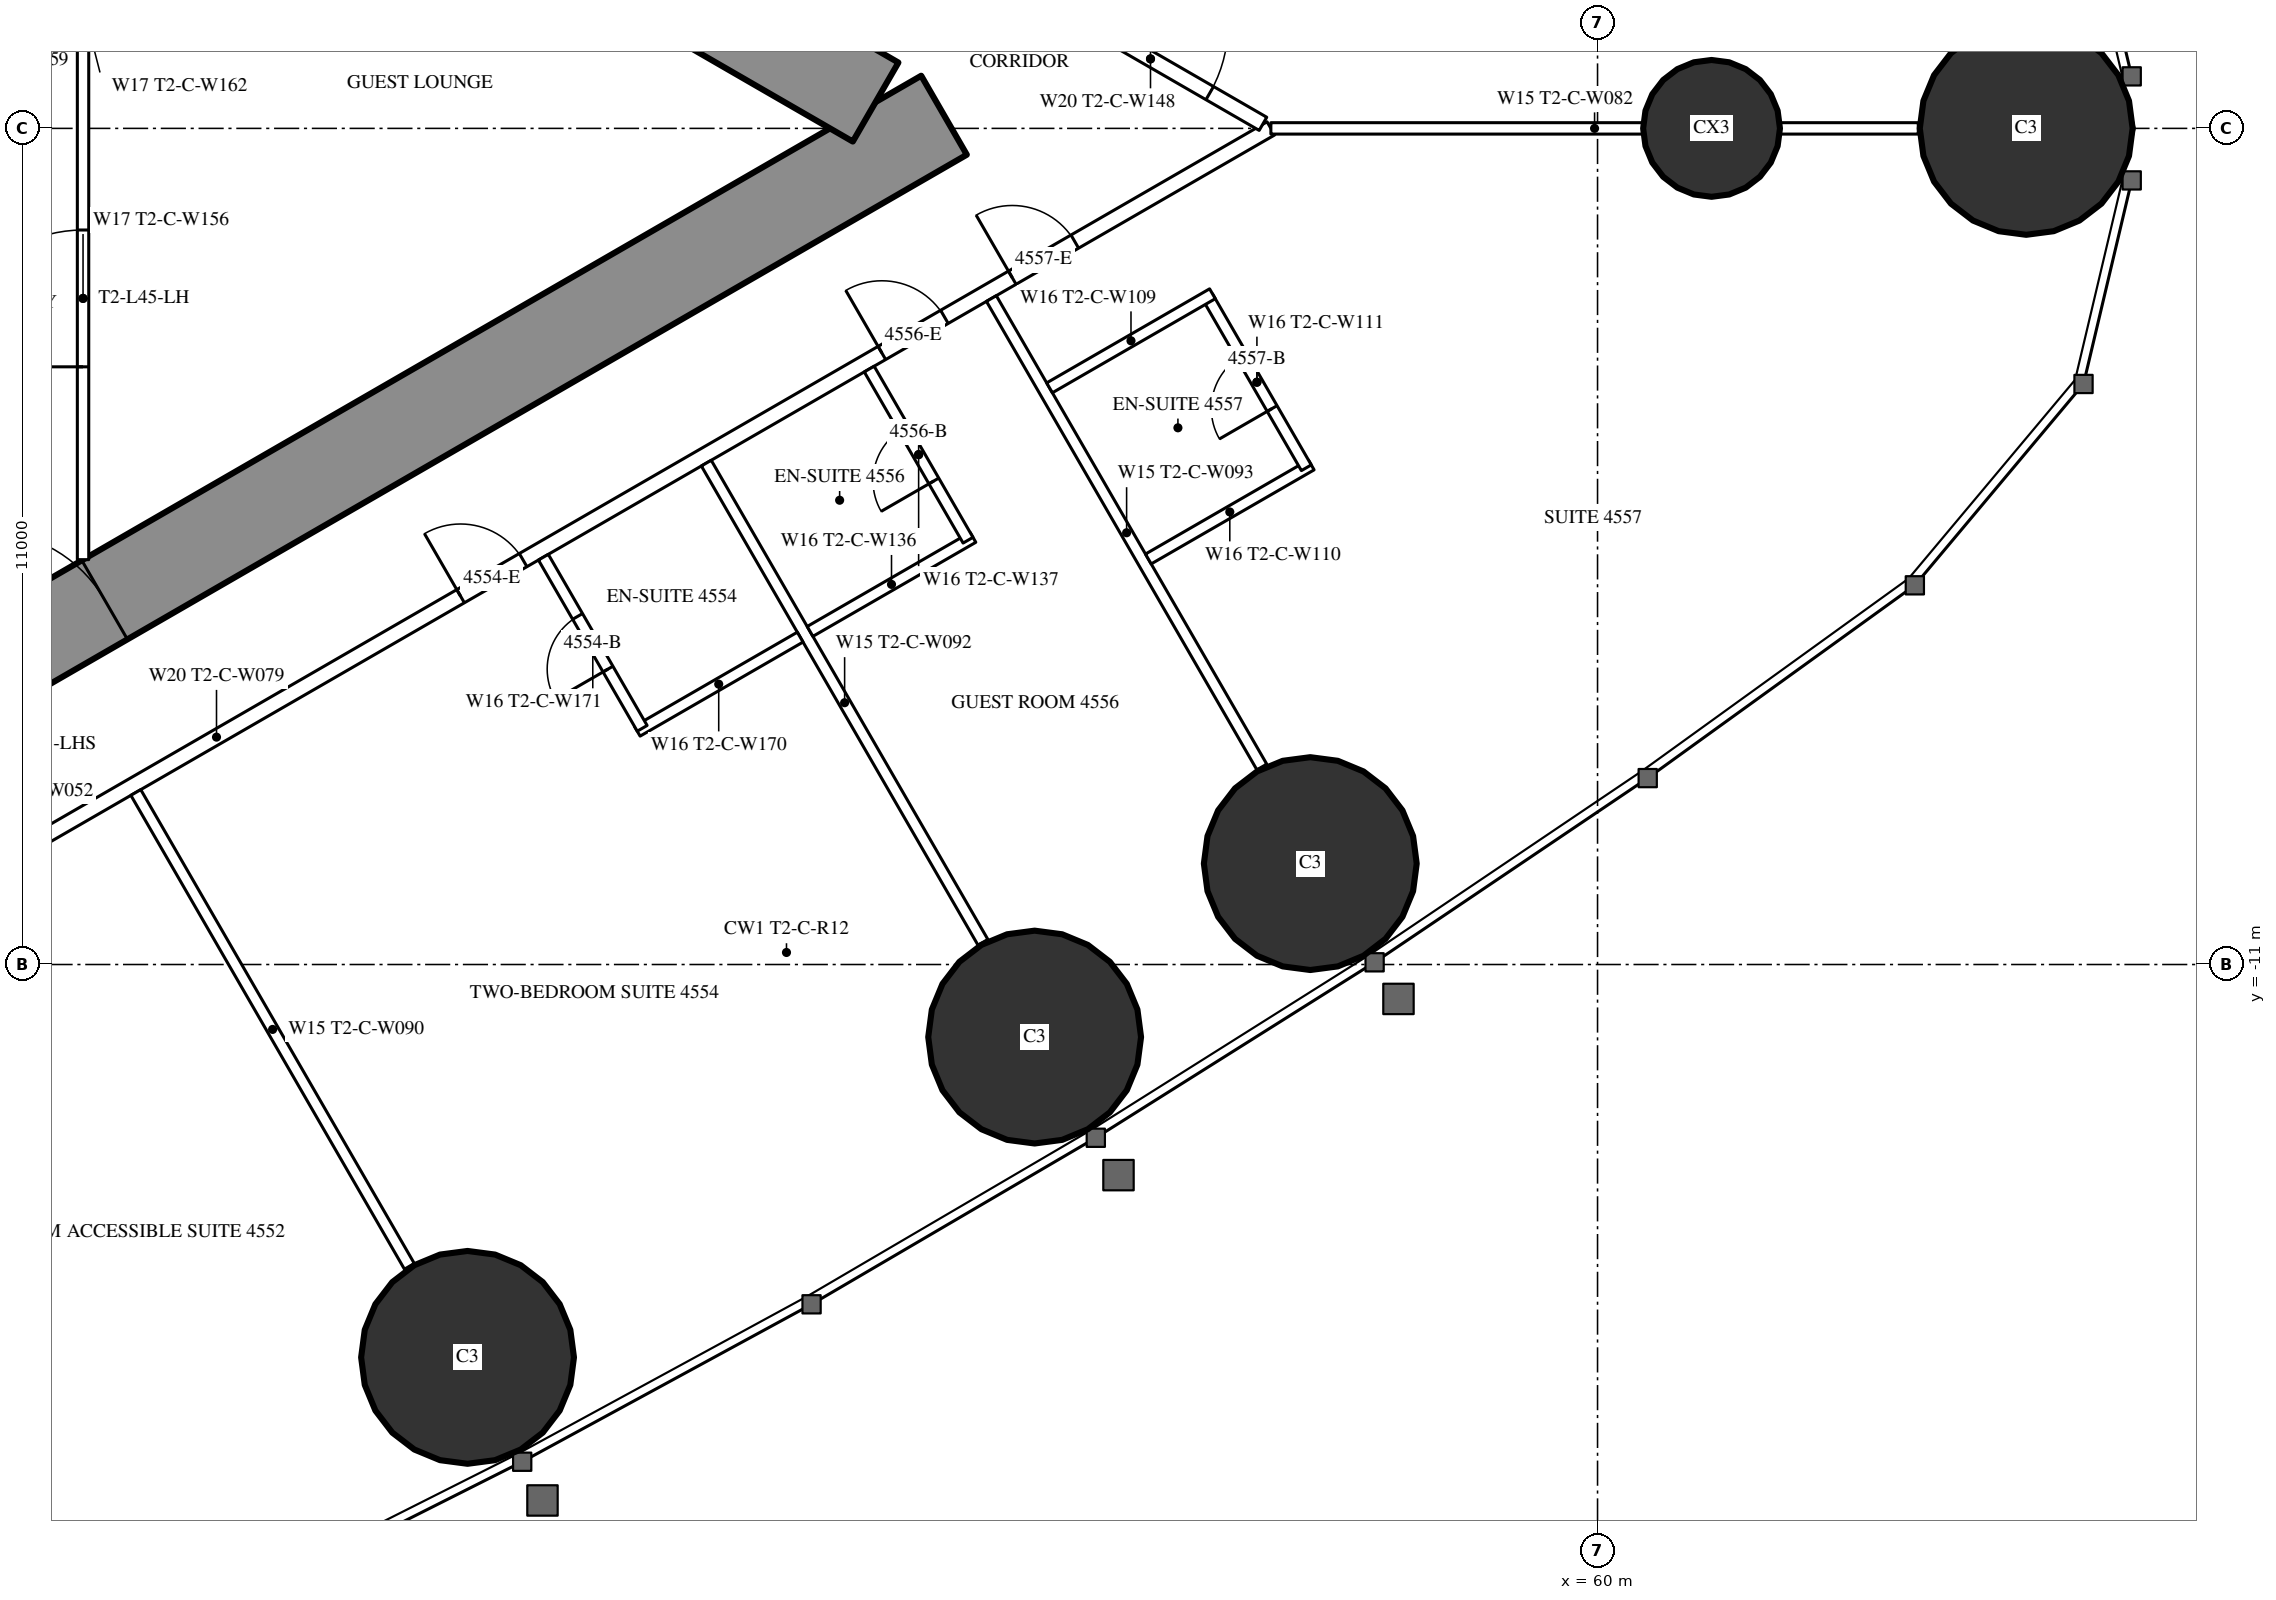
"""IFC4 building model, lengths in metres.
Left out: names, types, materials, properties, quantities, classifications, styles, units other than length and angle.
Written with IfcOpenShell. Run it as: python <this file> out.ifc"""

import sys

from ifc_helpers import new_model, si_unit, direction, frame, frame_2d, origin, origin_2d, place, context, subcontext, project, spatial, rectangle, circle, extrude, element, fill, save


model = new_model("IFC4")
c1 = context("Model", 3, precision=1e-05, world=origin(), true_north=direction((0.0, 1.0)))
c2 = subcontext(c1, "Body", "Model", "MODEL_VIEW")
j1 = project(units=[si_unit("LENGTHUNIT", "METRE"), si_unit("PLANEANGLEUNIT", "RADIAN")], contexts=[c1])
p1 = place(None, origin())
s1 = spatial("IfcSite", under=j1, at=p1, CompositionType="ELEMENT")
p2 = place(p1, origin())
s2 = spatial("IfcBuilding", under=s1, at=p2, CompositionType="ELEMENT")
p3 = place(p2, frame((0.0, 0.0, 170.3)))
s3 = spatial("IfcBuildingStorey", under=s2, at=p3, CompositionType="ELEMENT", Elevation=170.3)
for number, where, z_axis, x_axis in (
    (1, (65.64, 0.0, 0.0), (0.0, 0.0, 1.0), (1.0, 0.0, 0.0)),
    (2, (45.134, -16.168, 0.0), (0.0, 0.0, 1.0), (1.0, 0.0, 0.0)),
    (3, (52.594, -11.955, 0.0), (0.0, 0.0, 1.0), (1.0, 0.0, 0.0)),
    (4, (56.221, -9.672, 0.0), (0.0, 0.0, 1.0), (1.0, 0.0, 0.0)),
):
    element("IfcColumn", number, at=place(p3, frame(where, z_axis=z_axis, x_axis=x_axis)), inside=s3, PredefinedType="COLUMN", context=c2, shape_type="SweptSolid", body=[
        extrude(circle(Radius=1.4, at=origin_2d()), origin(), (0.0, 0.0, 1.0), 3.5),
    ])
p4 = place(p3, frame((61.5, 0.0, 0.0), z_axis=(0.0, 0.0, 1.0), x_axis=(1.0, 0.0, 0.0)))
e5 = element("IfcColumn", 5, at=p4, inside=s3, PredefinedType="COLUMN", context=c2, shape_type="SweptSolid", body=[
    extrude(circle(Radius=0.9, at=origin_2d()), origin(), (0.0, 0.0, 1.0), 3.5),
])
p5 = place(p3, frame((27.2, -13.8, 0.0), z_axis=(0.0, 0.0, 1.0), x_axis=(0.866027159892, 0.499996958321, 0.0)))
e6 = element("IfcWall", 6, at=p5, inside=s3, PredefinedType="SHEAR", context=c2, shape_type="SweptSolid", body=[
    extrude(rectangle(XDim=27.947, YDim=1.2, at=frame_2d((13.973, 0.0))), origin(), (0.0, 0.0, 1.0), 3.5),
])
p6 = place(p5, frame((4.6, 0.0, 0.0)))
e7 = element("IfcOpeningElement", 7, at=p6, cuts=e6, PredefinedType="OPENING", context=c2, shape_type="SweptSolid", body=[
    extrude(rectangle(XDim=1.0, YDim=2.2, at=frame_2d((0.5, 1.1))), frame((0.0, 0.61, 0.0), z_axis=(0.0, -1.0, 0.0), x_axis=(1.0, 0.0, 0.0)), (0.0, 0.0, 1.0), 1.22),
])
p7 = place(p5, frame((13.395, 0.0, 0.0)))
e8 = element("IfcOpeningElement", 8, at=p7, cuts=e6, PredefinedType="OPENING", context=c2, shape_type="SweptSolid", body=[
    extrude(rectangle(XDim=1.8, YDim=2.2, at=frame_2d((0.9, 1.1))), frame((0.0, 0.61, 0.0), z_axis=(0.0, -1.0, 0.0), x_axis=(1.0, 0.0, 0.0)), (0.0, 0.0, 1.0), 1.22),
])
p8 = place(p3, frame((27.2, 13.8, 0.0), z_axis=(0.0, 0.0, 1.0), x_axis=(0.866024515034, -0.500001539357, 0.0)))
e9 = element("IfcWall", 9, at=p8, inside=s3, PredefinedType="SHEAR", context=c2, shape_type="SweptSolid", body=[
    extrude(rectangle(XDim=26.907, YDim=1.2, at=frame_2d((13.454, 0.0))), origin(), (0.0, 0.0, 1.0), 3.5),
])
p9 = place(p8, frame((4.6, 0.0, 0.0)))
e10 = element("IfcOpeningElement", 10, at=p9, cuts=e9, PredefinedType="OPENING", context=c2, shape_type="SweptSolid", body=[
    extrude(rectangle(XDim=1.0, YDim=2.2, at=frame_2d((0.5, 1.1))), frame((0.0, 0.61, 0.0), z_axis=(0.0, -1.0, 0.0), x_axis=(1.0, 0.0, 0.0)), (0.0, 0.0, 1.0), 1.22),
])
p10 = place(p8, frame((13.395, 0.0, 0.0)))
e11 = element("IfcOpeningElement", 11, at=p10, cuts=e9, PredefinedType="OPENING", context=c2, shape_type="SweptSolid", body=[
    extrude(rectangle(XDim=1.8, YDim=2.2, at=frame_2d((0.9, 1.1))), frame((0.0, 0.61, 0.0), z_axis=(0.0, -1.0, 0.0), x_axis=(1.0, 0.0, 0.0)), (0.0, 0.0, 1.0), 1.22),
])
p11 = place(p3, frame((27.959, -16.017, 0.0), z_axis=(0.0, 0.0, 1.0), x_axis=(0.866024151371, 0.500002169237, 0.0)))
e12 = element("IfcWall", 12, at=p11, inside=s3, PredefinedType="PARTITIONING", context=c2, shape_type="SweptSolid", body=[
    extrude(rectangle(XDim=32.034, YDim=0.2, at=frame_2d((16.017, 0.0))), origin(), (0.0, 0.0, 1.0), 3.25),
])
p12 = place(p11, frame((4.765, 0.0, 0.0)))
e13 = element("IfcOpeningElement", 13, at=p12, cuts=e12, PredefinedType="OPENING", context=c2, shape_type="SweptSolid", body=[
    extrude(rectangle(XDim=0.95, YDim=2.2, at=frame_2d((0.475, 1.1))), frame((0.0, 0.11, 0.0), z_axis=(0.0, -1.0, 0.0), x_axis=(1.0, 0.0, 0.0)), (0.0, 0.0, 1.0), 0.22),
])
p13 = place(p11, frame((9.215, 0.0, 0.0)))
e14 = element("IfcOpeningElement", 14, at=p13, cuts=e12, PredefinedType="OPENING", context=c2, shape_type="SweptSolid", body=[
    extrude(rectangle(XDim=1.0, YDim=2.2, at=frame_2d((0.5, 1.1))), frame((0.0, 0.11, 0.0), z_axis=(0.0, -1.0, 0.0), x_axis=(1.0, 0.0, 0.0)), (0.0, 0.0, 1.0), 0.22),
])
p14 = place(p11, frame((19.725, 0.0, 0.0)))
e15 = element("IfcOpeningElement", 15, at=p14, cuts=e12, PredefinedType="OPENING", context=c2, shape_type="SweptSolid", body=[
    extrude(rectangle(XDim=0.95, YDim=2.2, at=frame_2d((0.475, 1.1))), frame((0.0, 0.11, 0.0), z_axis=(0.0, -1.0, 0.0), x_axis=(1.0, 0.0, 0.0)), (0.0, 0.0, 1.0), 0.22),
])
p15 = place(p11, frame((26.125, 0.0, 0.0)))
e16 = element("IfcOpeningElement", 16, at=p15, cuts=e12, PredefinedType="OPENING", context=c2, shape_type="SweptSolid", body=[
    extrude(rectangle(XDim=0.95, YDim=2.2, at=frame_2d((0.475, 1.1))), frame((0.0, 0.11, 0.0), z_axis=(0.0, -1.0, 0.0), x_axis=(1.0, 0.0, 0.0)), (0.0, 0.0, 1.0), 0.22),
])
p16 = place(p11, frame((28.106, 0.0, 0.0)))
e17 = element("IfcOpeningElement", 17, at=p16, cuts=e12, PredefinedType="OPENING", context=c2, shape_type="SweptSolid", body=[
    extrude(rectangle(XDim=0.95, YDim=2.2, at=frame_2d((0.475, 1.1))), frame((0.0, 0.11, 0.0), z_axis=(0.0, -1.0, 0.0), x_axis=(1.0, 0.0, 0.0)), (0.0, 0.0, 1.0), 0.22),
])
p17 = place(p3, frame((40.769, -8.737, 0.0), z_axis=(0.0, 0.0, 1.0), x_axis=(0.500013115284, -0.866017831539, 0.0)))
e18 = element("IfcWall", 18, at=p17, inside=s3, PredefinedType="PARTITIONING", context=c2, shape_type="SweptSolid", body=[
    extrude(rectangle(XDim=7.198, YDim=0.15, at=frame_2d((3.599, 0.0))), origin(), (0.0, 0.0, 1.0), 2.3),
])
p18 = place(p3, frame((48.275, -4.404, 0.0), z_axis=(0.0, 0.0, 1.0), x_axis=(0.500006004368, -0.866021937133, 0.0)))
e19 = element("IfcWall", 19, at=p18, inside=s3, PredefinedType="PARTITIONING", context=c2, shape_type="SweptSolid", body=[
    extrude(rectangle(XDim=7.279, YDim=0.15, at=frame_2d((3.64, 0.0))), origin(), (0.0, 0.0, 1.0), 2.3),
])
p19 = place(p3, frame((52.025, -2.238, 0.0), z_axis=(0.0, 0.0, 1.0), x_axis=(0.499983785035, -0.866034765296, 0.0)))
e20 = element("IfcWall", 20, at=p19, inside=s3, PredefinedType="PARTITIONING", context=c2, shape_type="SweptSolid", body=[
    extrude(rectangle(XDim=7.116, YDim=0.15, at=frame_2d((3.558, 0.0))), origin(), (0.0, 0.0, 1.0), 2.3),
])
p20 = place(p3, frame((55.702, 0.0, 0.0), z_axis=(0.0, 0.0, 1.0), x_axis=(1.0, 0.0, 0.0)))
e21 = element("IfcWall", 21, at=p20, inside=s3, PredefinedType="PARTITIONING", context=c2, shape_type="SweptSolid", body=[
    extrude(rectangle(XDim=8.518, YDim=0.15, at=frame_2d((4.259, 0.0))), origin(), (0.0, 0.0, 1.0), 2.3),
])
p21 = place(p3, frame((52.639, 1.769, 0.0), z_axis=(0.0, 0.0, 1.0), x_axis=(0.866027340901, -0.4999966448, 0.0)))
e22 = element("IfcWall", 22, at=p21, inside=s3, PredefinedType="PARTITIONING", context=c2, shape_type="SweptSolid", body=[
    extrude(rectangle(XDim=3.417, YDim=0.2, at=frame_2d((1.708, 0.0))), origin(), (0.0, 0.0, 1.0), 3.25),
])
p22 = place(p21, frame((0.809, 0.0, 0.0)))
e23 = element("IfcOpeningElement", 23, at=p22, cuts=e22, PredefinedType="OPENING", context=c2, shape_type="SweptSolid", body=[
    extrude(rectangle(XDim=1.8, YDim=2.2, at=frame_2d((0.9, 1.1))), frame((0.0, 0.11, 0.0), z_axis=(0.0, -1.0, 0.0), x_axis=(1.0, 0.0, 0.0)), (0.0, 0.0, 1.0), 0.22),
])
p23 = place(p3, frame((47.366, -7.93, 0.0), z_axis=(0.0, 0.0, 1.0), x_axis=(0.866031185235, 0.4999899861, 0.0)))
e24 = element("IfcWall", 24, at=p23, inside=s3, PredefinedType="PARTITIONING", context=c2, shape_type="SweptSolid", body=[
    extrude(rectangle(XDim=2.475, YDim=0.15, at=frame_2d((1.238, 0.0))), origin(), (0.0, 0.0, 1.0), 3.25),
])
p24 = place(p3, frame((46.131, -5.641, 0.0), z_axis=(0.0, 0.0, 1.0), x_axis=(0.49997716683, -0.86603858612, 0.0)))
e25 = element("IfcWall", 25, at=p24, inside=s3, PredefinedType="PARTITIONING", context=c2, shape_type="SweptSolid", body=[
    extrude(rectangle(XDim=2.6, YDim=0.15, at=frame_2d((1.3, 0.0))), origin(), (0.0, 0.0, 1.0), 3.25),
])
p25 = place(p24, frame((0.9, 0.0, 0.0)))
e26 = element("IfcOpeningElement", 26, at=p25, cuts=e25, PredefinedType="OPENING", context=c2, shape_type="SweptSolid", body=[
    extrude(rectangle(XDim=0.8, YDim=2.2, at=frame_2d((0.4, 1.1))), frame((0.0, 0.085, 0.0), z_axis=(0.0, -1.0, 0.0), x_axis=(1.0, 0.0, 0.0)), (0.0, 0.0, 1.0), 0.17),
])
p26 = place(p3, frame((49.64, -6.618, 0.0), z_axis=(0.0, 0.0, 1.0), x_axis=(0.866006523861, 0.500032699561, 0.0)))
e27 = element("IfcWall", 27, at=p26, inside=s3, PredefinedType="PARTITIONING", context=c2, shape_type="SweptSolid", body=[
    extrude(rectangle(XDim=2.475, YDim=0.15, at=frame_2d((1.237, 0.0))), origin(), (0.0, 0.0, 1.0), 3.25),
])
p27 = place(p3, frame((50.418, -3.166, 0.0), z_axis=(0.0, 0.0, 1.0), x_axis=(0.499936506574, -0.866062058628, 0.0)))
e28 = element("IfcWall", 28, at=p27, inside=s3, PredefinedType="PARTITIONING", context=c2, shape_type="SweptSolid", body=[
    extrude(rectangle(XDim=2.6, YDim=0.15, at=frame_2d((1.3, 0.0))), origin(), (0.0, 0.0, 1.0), 3.25),
])
p28 = place(p27, frame((0.9, 0.0, 0.0)))
e29 = element("IfcOpeningElement", 29, at=p28, cuts=e28, PredefinedType="OPENING", context=c2, shape_type="SweptSolid", body=[
    extrude(rectangle(XDim=0.8, YDim=2.2, at=frame_2d((0.4, 1.1))), frame((0.0, 0.085, 0.0), z_axis=(0.0, -1.0, 0.0), x_axis=(1.0, 0.0, 0.0)), (0.0, 0.0, 1.0), 0.17),
])
p29 = place(p3, frame((54.09, -5.665, 0.0), z_axis=(0.0, 0.0, 1.0), x_axis=(0.866006523861, 0.500032699561, 0.0)))
e30 = element("IfcWall", 30, at=p29, inside=s3, PredefinedType="PARTITIONING", context=c2, shape_type="SweptSolid", body=[
    extrude(rectangle(XDim=2.475, YDim=0.15, at=frame_2d((1.237, 0.0))), origin(), (0.0, 0.0, 1.0), 3.25),
])
p30 = place(p3, frame((54.869, -2.213, 0.0), z_axis=(0.0, 0.0, 1.0), x_axis=(0.500047596559, -0.865997922154, 0.0)))
e31 = element("IfcWall", 31, at=p30, inside=s3, PredefinedType="PARTITIONING", context=c2, shape_type="SweptSolid", body=[
    extrude(rectangle(XDim=2.6, YDim=0.15, at=frame_2d((1.3, 0.0))), origin(), (0.0, 0.0, 1.0), 3.25),
])
p31 = place(p30, frame((0.9, 0.0, 0.0)))
e32 = element("IfcOpeningElement", 32, at=p31, cuts=e31, PredefinedType="OPENING", context=c2, shape_type="SweptSolid", body=[
    extrude(rectangle(XDim=0.8, YDim=2.2, at=frame_2d((0.4, 1.1))), frame((0.0, 0.085, 0.0), z_axis=(0.0, -1.0, 0.0), x_axis=(1.0, 0.0, 0.0)), (0.0, 0.0, 1.0), 0.17),
])
p32 = place(p3, frame((52.79, -3.413, 0.0), z_axis=(0.0, 0.0, 1.0), x_axis=(0.866006523861, 0.500032699561, 0.0)))
e33 = element("IfcWall", 33, at=p32, inside=s3, PredefinedType="PARTITIONING", context=c2, shape_type="SweptSolid", body=[
    extrude(rectangle(XDim=2.475, YDim=0.15, at=frame_2d((1.237, 0.0))), origin(), (0.0, 0.0, 1.0), 3.25),
])
p33 = place(p3, frame((40.075, -5.674, 0.0), z_axis=(0.0, 0.0, 1.0), x_axis=(0.0, 1.0, 0.0)))
e34 = element("IfcWall", 34, at=p33, inside=s3, PredefinedType="PARTITIONING", context=c2, shape_type="SweptSolid", body=[
    extrude(rectangle(XDim=6.874, YDim=0.15, at=frame_2d((3.437, 0.0))), origin(), (0.0, 0.0, 1.0), 3.25),
])
p34 = place(p33, frame((2.537, 0.0, 0.0)))
e35 = element("IfcOpeningElement", 35, at=p34, cuts=e34, PredefinedType="OPENING", context=c2, shape_type="SweptSolid", body=[
    extrude(rectangle(XDim=1.8, YDim=2.2, at=frame_2d((0.9, 1.1))), frame((0.0, 0.085, 0.0), z_axis=(0.0, -1.0, 0.0), x_axis=(1.0, 0.0, 0.0)), (0.0, 0.0, 1.0), 0.17),
])
p35 = place(p25, origin())
e36 = element("IfcDoor", 36, at=p35, inside=s3, OperationType="SINGLE_SWING_RIGHT", PredefinedType="DOOR", context=c2, shape_type="SweptSolid", body=[
    extrude(rectangle(XDim=0.8, YDim=2.2, at=frame_2d((0.4, 1.1))), frame((0.0, 0.025, 0.0), z_axis=(0.0, -1.0, 0.0), x_axis=(1.0, 0.0, 0.0)), (0.0, 0.0, 1.0), 0.05),
])
fill(e26, e36)
p36 = place(p14, origin())
e37 = element("IfcDoor", 37, at=p36, inside=s3, OperationType="SINGLE_SWING_LEFT", PredefinedType="DOOR", context=c2, shape_type="SweptSolid", body=[
    extrude(rectangle(XDim=0.95, YDim=2.2, at=frame_2d((0.475, 1.1))), frame((0.0, 0.025, 0.0), z_axis=(0.0, -1.0, 0.0), x_axis=(1.0, 0.0, 0.0)), (0.0, 0.0, 1.0), 0.05),
])
fill(e15, e37)
p37 = place(p28, origin())
e38 = element("IfcDoor", 38, at=p37, inside=s3, OperationType="SINGLE_SWING_RIGHT", PredefinedType="DOOR", context=c2, shape_type="SweptSolid", body=[
    extrude(rectangle(XDim=0.8, YDim=2.2, at=frame_2d((0.4, 1.1))), frame((0.0, 0.025, 0.0), z_axis=(0.0, -1.0, 0.0), x_axis=(1.0, 0.0, 0.0)), (0.0, 0.0, 1.0), 0.05),
])
fill(e29, e38)
p38 = place(p15, origin())
e39 = element("IfcDoor", 39, at=p38, inside=s3, OperationType="SINGLE_SWING_LEFT", PredefinedType="DOOR", context=c2, shape_type="SweptSolid", body=[
    extrude(rectangle(XDim=0.95, YDim=2.2, at=frame_2d((0.475, 1.1))), frame((0.0, 0.025, 0.0), z_axis=(0.0, -1.0, 0.0), x_axis=(1.0, 0.0, 0.0)), (0.0, 0.0, 1.0), 0.05),
])
fill(e16, e39)
p39 = place(p31, origin())
e40 = element("IfcDoor", 40, at=p39, inside=s3, OperationType="SINGLE_SWING_RIGHT", PredefinedType="DOOR", context=c2, shape_type="SweptSolid", body=[
    extrude(rectangle(XDim=0.8, YDim=2.2, at=frame_2d((0.4, 1.1))), frame((0.0, 0.025, 0.0), z_axis=(0.0, -1.0, 0.0), x_axis=(1.0, 0.0, 0.0)), (0.0, 0.0, 1.0), 0.05),
])
fill(e32, e40)
p40 = place(p16, origin())
e41 = element("IfcDoor", 41, at=p40, inside=s3, OperationType="SINGLE_SWING_LEFT", PredefinedType="DOOR", context=c2, shape_type="SweptSolid", body=[
    extrude(rectangle(XDim=0.95, YDim=2.2, at=frame_2d((0.475, 1.1))), frame((0.0, 0.025, 0.0), z_axis=(0.0, -1.0, 0.0), x_axis=(1.0, 0.0, 0.0)), (0.0, 0.0, 1.0), 0.05),
])
fill(e17, e41)
p41 = place(p22, origin())
e42 = element("IfcDoor", 42, at=p41, inside=s3, OperationType="DOUBLE_DOOR_SINGLE_SWING", PredefinedType="DOOR", context=c2, shape_type="SweptSolid", body=[
    extrude(rectangle(XDim=1.8, YDim=2.2, at=frame_2d((0.9, 1.1))), frame((0.0, 0.025, 0.0), z_axis=(0.0, -1.0, 0.0), x_axis=(1.0, 0.0, 0.0)), (0.0, 0.0, 1.0), 0.05),
])
fill(e23, e42)
p42 = place(p34, origin())
e43 = element("IfcDoor", 43, at=p42, inside=s3, OperationType="DOUBLE_DOOR_SINGLE_SWING", PredefinedType="DOOR", context=c2, shape_type="SweptSolid", body=[
    extrude(rectangle(XDim=1.8, YDim=2.2, at=frame_2d((0.9, 1.1))), frame((0.0, 0.025, 0.0), z_axis=(0.0, -1.0, 0.0), x_axis=(1.0, 0.0, 0.0)), (0.0, 0.0, 1.0), 0.05),
])
fill(e35, e43)
p43 = place(p7, origin())
e44 = element("IfcDoor", 44, at=p43, inside=s3, OperationType="DOUBLE_DOOR_SINGLE_SWING", PredefinedType="DOOR", context=c2, shape_type="SweptSolid", body=[
    extrude(rectangle(XDim=1.8, YDim=2.2, at=frame_2d((0.9, 1.1))), frame((0.0, 0.025, 0.0), z_axis=(0.0, -1.0, 0.0), x_axis=(1.0, 0.0, 0.0)), (0.0, 0.0, 1.0), 0.05),
])
fill(e8, e44)
save(model, sys.argv[1])
